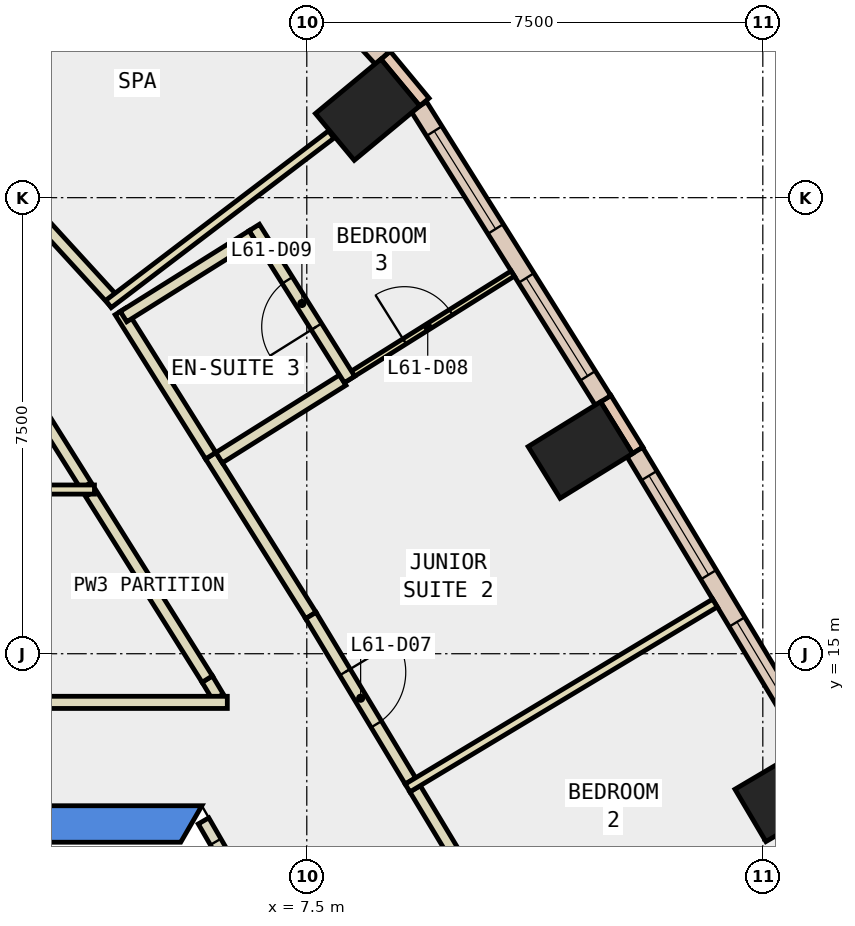
"""IFC4 building model, lengths in metres.
Left out: names, types, materials, properties, quantities, classifications, styles, units other than length and angle.
Written with IfcOpenShell. Run it as: python <this file> out.ifc"""

import sys

from ifc_helpers import new_model, si_unit, direction, frame, frame_2d, origin, origin_2d, place, context, subcontext, project, spatial, polyline, rectangle, outline, extrude, element, fill, save


model = new_model("IFC4")
c1 = context("Model", 3, precision=1e-05, world=origin(), true_north=direction((0.0, 1.0)))
c2 = subcontext(c1, "Body", "Model", "MODEL_VIEW")
j1 = project(units=[si_unit("LENGTHUNIT", "METRE"), si_unit("PLANEANGLEUNIT", "RADIAN")], contexts=[c1])
p1 = place(None, origin())
s1 = spatial("IfcSite", under=j1, at=p1, CompositionType="ELEMENT")
p2 = place(p1, origin())
s2 = spatial("IfcBuilding", under=s1, at=p2, CompositionType="ELEMENT")
p3 = place(p2, frame((0.0, 0.0, 266.6)))
s3 = spatial("IfcBuildingStorey", under=s2, at=p3, CompositionType="ELEMENT", Elevation=266.6)
for number, where, z_axis, x_axis in (
    (1, (15.399, 12.697, -0.34), (0.0, 0.0, 1.0), (-0.509, 0.861, 0.0)),
    (2, (11.999, 18.349, -0.34), (0.0, 0.0, 1.0), (-0.526, 0.851, 0.0)),
    (3, (8.5, 23.946, -0.34), (0.0, 0.0, 1.0), (-0.639, 0.769, 0.0)),
):
    element("IfcColumn", number, at=place(p3, frame(where, z_axis=z_axis, x_axis=x_axis)), inside=s3, PredefinedType="COLUMN", context=c2, shape_type="SweptSolid", body=[
        extrude(rectangle(XDim=1.0, YDim=1.4, at=origin_2d()), origin(), (0.0, 0.0, 1.0), 3.6),
    ])
p4 = place(p3, frame((0.0, 0.0, -0.34)))
e4 = element("IfcWall", 4, at=p4, inside=s3, PredefinedType="SHEAR", context=c2, shape_type="SweptSolid", body=[
    extrude(outline(polyline([(5.774, 12.5), (-5.774, 12.5), (-5.427, 11.9), (5.427, 11.9), (5.774, 12.5)])), origin(), (0.0, 0.0, 1.0), 3.6),
])
p5 = place(p3, frame((12.943, 18.344, 0.0), z_axis=(0.0, 0.0, 1.0), x_axis=(-0.525825307325, 0.850592585306, 0.0)))
e5 = element("IfcWall", 5, at=p5, inside=s3, PredefinedType="STANDARD", context=c2, shape_type="SweptSolid", body=[
    extrude(rectangle(XDim=1.0, YDim=0.2, at=frame_2d((0.5, 0.0))), origin(), (0.0, 0.0, 1.0), 3.26),
])
p6 = place(p3, frame((9.434, 24.072, 0.0), z_axis=(0.0, 0.0, 1.0), x_axis=(-0.638117112481, 0.769939316283, 0.0)))
e6 = element("IfcWall", 6, at=p6, inside=s3, PredefinedType="STANDARD", context=c2, shape_type="SweptSolid", body=[
    extrude(rectangle(XDim=1.0, YDim=0.2, at=frame_2d((0.5, 0.0))), origin(), (0.0, 0.0, 1.0), 3.26),
])
p7 = place(p3, frame((15.788, 13.506, 0.0), z_axis=(0.0, 0.0, 1.0), x_axis=(-0.515435742129, 0.856928232547, 0.0)))
e7 = element("IfcWall", 7, at=p7, inside=s3, PredefinedType="STANDARD", context=c2, shape_type="SweptSolid", body=[
    extrude(rectangle(XDim=5.613, YDim=0.3, at=frame_2d((2.806, 0.0))), origin(), (0.0, 0.0, 1.0), 3.26),
])
p8 = place(p7, frame((0.453, 0.0, 0.9)))
e8 = element("IfcOpeningElement", 8, at=p8, cuts=e7, PredefinedType="OPENING", context=c2, shape_type="SweptSolid", body=[
    extrude(rectangle(XDim=1.9, YDim=2.0, at=frame_2d((0.95, 1.0))), frame((0.0, 0.16, 0.0), z_axis=(0.0, -1.0, 0.0), x_axis=(1.0, 0.0, 0.0)), (0.0, 0.0, 1.0), 0.32),
])
p9 = place(p7, frame((3.26, 0.0, 0.9)))
e9 = element("IfcOpeningElement", 9, at=p9, cuts=e7, PredefinedType="OPENING", context=c2, shape_type="SweptSolid", body=[
    extrude(rectangle(XDim=1.9, YDim=2.0, at=frame_2d((0.95, 1.0))), frame((0.0, 0.16, 0.0), z_axis=(0.0, -1.0, 0.0), x_axis=(1.0, 0.0, 0.0)), (0.0, 0.0, 1.0), 0.32),
])
p10 = place(p3, frame((12.372, 19.166, 0.0), z_axis=(0.0, 0.0, 1.0), x_axis=(-0.531137483242, 0.847285650708, 0.0)))
e10 = element("IfcWall", 10, at=p10, inside=s3, PredefinedType="STANDARD", context=c2, shape_type="SweptSolid", body=[
    extrude(rectangle(XDim=5.703, YDim=0.3, at=frame_2d((2.852, 0.0))), origin(), (0.0, 0.0, 1.0), 3.26),
])
p11 = place(p10, frame((0.476, 0.0, 0.9)))
e11 = element("IfcOpeningElement", 11, at=p11, cuts=e10, PredefinedType="OPENING", context=c2, shape_type="SweptSolid", body=[
    extrude(rectangle(XDim=1.9, YDim=2.0, at=frame_2d((0.95, 1.0))), frame((0.0, 0.16, 0.0), z_axis=(0.0, -1.0, 0.0), x_axis=(1.0, 0.0, 0.0)), (0.0, 0.0, 1.0), 0.32),
])
p12 = place(p10, frame((3.327, 0.0, 0.9)))
e12 = element("IfcOpeningElement", 12, at=p12, cuts=e10, PredefinedType="OPENING", context=c2, shape_type="SweptSolid", body=[
    extrude(rectangle(XDim=1.9, YDim=2.0, at=frame_2d((0.95, 1.0))), frame((0.0, 0.16, 0.0), z_axis=(0.0, -1.0, 0.0), x_axis=(1.0, 0.0, 0.0)), (0.0, 0.0, 1.0), 0.32),
])
p13 = place(p3, frame((8.739, 24.794, 0.0), z_axis=(0.0, 0.0, 1.0), x_axis=(-0.675143863554, 0.737686087374, 0.0)))
e13 = element("IfcWall", 13, at=p13, inside=s3, PredefinedType="STANDARD", context=c2, shape_type="SweptSolid", body=[
    extrude(rectangle(XDim=4.38, YDim=0.3, at=frame_2d((2.19, 0.0))), origin(), (0.0, 0.0, 1.0), 3.26),
])
p14 = place(p13, frame((1.49, 0.0, 0.9)))
e14 = element("IfcOpeningElement", 14, at=p14, cuts=e13, PredefinedType="OPENING", context=c2, shape_type="SweptSolid", body=[
    extrude(rectangle(XDim=1.4, YDim=2.0, at=frame_2d((0.7, 1.0))), frame((0.0, 0.16, 0.0), z_axis=(0.0, -1.0, 0.0), x_axis=(1.0, 0.0, 0.0)), (0.0, 0.0, 1.0), 0.32),
])
p15 = place(p3, frame((6.041, 14.286, 0.0), z_axis=(0.0, 0.0, 1.0), x_axis=(-0.513873647624, 0.857865883619, 0.0)))
e15 = element("IfcWall", 15, at=p15, inside=s3, PredefinedType="PARTITIONING", context=c2, shape_type="SweptSolid", body=[
    extrude(rectangle(XDim=0.346, YDim=0.2, at=frame_2d((0.173, 0.0))), origin(), (0.0, 0.0, 1.0), 3.26),
])
p16 = place(p3, frame((5.863, 14.583, 0.0), z_axis=(0.0, 0.0, 1.0), x_axis=(-0.531380509042, 0.847133256702, 0.0)))
e16 = element("IfcWall", 16, at=p16, inside=s3, PredefinedType="PARTITIONING", context=c2, shape_type="SweptSolid", body=[
    extrude(rectangle(XDim=3.604, YDim=0.2, at=frame_2d((1.802, 0.0))), origin(), (0.0, 0.0, 1.0), 3.26),
])
p17 = place(p3, frame((3.868, 17.764, 0.0), z_axis=(0.0, 0.0, 1.0), x_axis=(-0.531062870102, 0.847332418829, 0.0)))
e17 = element("IfcWall", 17, at=p17, inside=s3, PredefinedType="PARTITIONING", context=c2, shape_type="SweptSolid", body=[
    extrude(rectangle(XDim=2.062, YDim=0.2, at=frame_2d((1.031, 0.0))), origin(), (0.0, 0.0, 1.0), 3.26),
])
p18 = place(p3, frame((9.281, 12.779, 0.0), z_axis=(0.0, 0.0, 1.0), x_axis=(0.515568955032, -0.856848091908, 0.0)))
e18 = element("IfcWall", 18, at=p18, inside=s3, PredefinedType="PARTITIONING", context=c2, shape_type="SweptSolid", body=[
    extrude(rectangle(XDim=3.177, YDim=0.2, at=frame_2d((1.588, 0.0))), origin(), (0.0, 0.0, 1.0), 3.26),
])
p19 = place(p3, frame((5.92, 18.256, 0.0), z_axis=(0.0, 0.0, 1.0), x_axis=(0.531152062518, -0.84727651123, 0.0)))
e19 = element("IfcWall", 19, at=p19, inside=s3, PredefinedType="PARTITIONING", context=c2, shape_type="SweptSolid", body=[
    extrude(rectangle(XDim=3.101, YDim=0.2, at=frame_2d((1.55, 0.0))), origin(), (0.0, 0.0, 1.0), 3.26),
])
p20 = place(p3, frame((7.567, 15.629, 0.0), z_axis=(0.0, 0.0, 1.0), x_axis=(0.51556943596, -0.856847802532, 0.0)))
e20 = element("IfcWall", 20, at=p20, inside=s3, PredefinedType="PARTITIONING", context=c2, shape_type="SweptSolid", body=[
    extrude(rectangle(XDim=3.176, YDim=0.2, at=frame_2d((1.588, 0.0))), origin(), (0.0, 0.0, 1.0), 3.26),
])
p21 = place(p20, frame((1.088, 0.0, 0.0)))
e21 = element("IfcOpeningElement", 21, at=p21, cuts=e20, PredefinedType="OPENING", context=c2, shape_type="SweptSolid", body=[
    extrude(rectangle(XDim=1.0, YDim=2.1, at=frame_2d((0.5, 1.05))), frame((0.0, 0.11, 0.0), z_axis=(0.0, -1.0, 0.0), x_axis=(1.0, 0.0, 0.0)), (0.0, 0.0, 1.0), 0.22),
])
p22 = place(p3, frame((4.433, 20.628, 0.0), z_axis=(0.0, 0.0, 1.0), x_axis=(0.531135189756, -0.84728708842, 0.0)))
e22 = element("IfcWall", 22, at=p22, inside=s3, PredefinedType="PARTITIONING", context=c2, shape_type="SweptSolid", body=[
    extrude(rectangle(XDim=2.799, YDim=0.2, at=frame_2d((1.4, 0.0))), origin(), (0.0, 0.0, 1.0), 3.26),
])
p23 = place(p3, frame((2.084, 23.253, 0.0), z_axis=(0.0, 0.0, 1.0), x_axis=(0.675074517272, -0.737749548377, 0.0)))
e23 = element("IfcWall", 23, at=p23, inside=s3, PredefinedType="PARTITIONING", context=c2, shape_type="SweptSolid", body=[
    extrude(rectangle(XDim=3.334, YDim=0.2, at=frame_2d((1.667, 0.0))), origin(), (0.0, 0.0, 1.0), 3.26),
])
p24 = place(p3, frame((9.157, 12.792, 0.0), z_axis=(0.0, 0.0, 1.0), x_axis=(0.856933793276, 0.515426497129, 0.0)))
e24 = element("IfcWall", 24, at=p24, inside=s3, PredefinedType="PARTITIONING", context=c2, shape_type="SweptSolid", body=[
    extrude(rectangle(XDim=5.9, YDim=0.15, at=frame_2d((2.95, 0.0))), origin(), (0.0, 0.0, 1.0), 3.26),
])
p25 = place(p3, frame((8.091, 19.499, 0.0), z_axis=(0.0, 0.0, 1.0), x_axis=(0.847249319986, 0.53119543464, 0.0)))
e25 = element("IfcWall", 25, at=p25, inside=s3, PredefinedType="PARTITIONING", context=c2, shape_type="SweptSolid", body=[
    extrude(rectangle(XDim=3.3, YDim=0.1, at=frame_2d((1.65, 0.0))), origin(), (0.0, 0.0, 1.0), 3.26),
])
p26 = place(p25, frame((1.2, 0.0, 0.0)))
e26 = element("IfcOpeningElement", 26, at=p26, cuts=e25, PredefinedType="OPENING", context=c2, shape_type="SweptSolid", body=[
    extrude(rectangle(XDim=0.9, YDim=2.1, at=frame_2d((0.45, 1.05))), frame((0.0, 0.06, 0.0), z_axis=(0.0, -1.0, 0.0), x_axis=(1.0, 0.0, 0.0)), (0.0, 0.0, 1.0), 0.12),
])
p27 = place(p3, frame((6.058, 18.224, 0.0), z_axis=(0.0, 0.0, 1.0), x_axis=(0.847191403331, 0.531287799711, 0.0)))
e27 = element("IfcWall", 27, at=p27, inside=s3, PredefinedType="PARTITIONING", context=c2, shape_type="SweptSolid", body=[
    extrude(rectangle(XDim=2.4, YDim=0.2, at=frame_2d((1.2, 0.0))), origin(), (0.0, 0.0, 1.0), 3.26),
])
p28 = place(p3, frame((8.203, 19.51, 0.0), z_axis=(0.0, 0.0, 1.0), x_axis=(-0.531218552952, 0.847234825181, 0.0)))
e28 = element("IfcWall", 28, at=p28, inside=s3, PredefinedType="PARTITIONING", context=c2, shape_type="SweptSolid", body=[
    extrude(rectangle(XDim=2.95, YDim=0.2, at=frame_2d((1.475, 0.0))), origin(), (0.0, 0.0, 1.0), 3.26),
])
p29 = place(p28, frame((1.025, 0.0, 0.0)))
e29 = element("IfcOpeningElement", 29, at=p29, cuts=e28, PredefinedType="OPENING", context=c2, shape_type="SweptSolid", body=[
    extrude(rectangle(XDim=0.9, YDim=2.1, at=frame_2d((0.45, 1.05))), frame((0.0, 0.11, 0.0), z_axis=(0.0, -1.0, 0.0), x_axis=(1.0, 0.0, 0.0)), (0.0, 0.0, 1.0), 0.22),
])
p30 = place(p3, frame((6.604, 21.871, 0.0), z_axis=(0.0, 0.0, 1.0), x_axis=(-0.847377617561, -0.530990746866, 0.0)))
e30 = element("IfcWall", 30, at=p30, inside=s3, PredefinedType="PARTITIONING", context=c2, shape_type="SweptSolid", body=[
    extrude(rectangle(XDim=2.499, YDim=0.2, at=frame_2d((1.25, 0.0))), origin(), (0.0, 0.0, 1.0), 3.26),
])
p31 = place(p3, frame((4.238, 20.751, 0.0), z_axis=(0.0, 0.0, 1.0), x_axis=(0.795806473987, 0.605551034976, 0.0)))
e31 = element("IfcWall", 31, at=p31, inside=s3, PredefinedType="PARTITIONING", context=c2, shape_type="SweptSolid", body=[
    extrude(rectangle(XDim=4.604, YDim=0.15, at=frame_2d((2.302, 0.0))), origin(), (0.0, 0.0, 1.0), 3.26),
])
p32 = place(p3, frame((6.699, 10.697, 0.0), z_axis=(0.0, 0.0, 1.0), x_axis=(-0.499914839587, 0.866074565589, 0.0)))
e32 = element("IfcWall", 32, at=p32, inside=s3, PredefinedType="PARTITIONING", context=c2, shape_type="SweptSolid", body=[
    extrude(rectangle(XDim=1.794, YDim=0.2, at=frame_2d((0.897, 0.0))), origin(), (0.0, 0.0, 1.0), 2.4),
])
p33 = place(p32, frame((0.397, 0.0, 0.0)))
e33 = element("IfcOpeningElement", 33, at=p33, cuts=e32, PredefinedType="OPENING", context=c2, shape_type="SweptSolid", body=[
    extrude(rectangle(XDim=1.0, YDim=2.1, at=frame_2d((0.5, 1.05))), frame((0.0, 0.11, 0.0), z_axis=(0.0, -1.0, 0.0), x_axis=(1.0, 0.0, 0.0)), (0.0, 0.0, 1.0), 0.22),
])
p34 = place(p3, frame((0.4, 14.2, 0.0), z_axis=(0.0, 0.0, 1.0), x_axis=(1.0, 0.0, 0.0)))
e34 = element("IfcWall", 34, at=p34, inside=s3, PredefinedType="PARTITIONING", context=c2, shape_type="SweptSolid", body=[
    extrude(rectangle(XDim=5.793, YDim=0.2, at=frame_2d((2.896, 0.0))), origin(), (0.0, 0.0, 1.0), 3.26),
])
p35 = place(p34, frame((0.095, 0.0, 0.0)))
e35 = element("IfcOpeningElement", 35, at=p35, cuts=e34, PredefinedType="OPENING", context=c2, shape_type="SweptSolid", body=[
    extrude(rectangle(XDim=1.0, YDim=2.1, at=frame_2d((0.5, 1.05))), frame((0.0, 0.11, 0.0), z_axis=(0.0, -1.0, 0.0), x_axis=(1.0, 0.0, 0.0)), (0.0, 0.0, 1.0), 0.22),
])
p36 = place(p3, frame((0.4, 17.7, 0.0), z_axis=(0.0, 0.0, 1.0), x_axis=(1.0, 0.0, 0.0)))
e36 = element("IfcWall", 36, at=p36, inside=s3, PredefinedType="PARTITIONING", context=c2, shape_type="SweptSolid", body=[
    extrude(rectangle(XDim=3.608, YDim=0.15, at=frame_2d((1.804, 0.0))), origin(), (0.0, 0.0, 1.0), 3.26),
])
p37 = place(p8, origin())
e37 = element("IfcWindow", 37, at=p37, inside=s3, PartitioningType="SINGLE_PANEL", PredefinedType="WINDOW", context=c2, shape_type="SweptSolid", body=[
    extrude(rectangle(XDim=1.9, YDim=2.0, at=frame_2d((0.95, 1.0))), frame((0.0, 0.03, 0.0), z_axis=(0.0, -1.0, 0.0), x_axis=(1.0, 0.0, 0.0)), (0.0, 0.0, 1.0), 0.06),
])
fill(e8, e37)
p38 = place(p9, origin())
e38 = element("IfcWindow", 38, at=p38, inside=s3, PartitioningType="SINGLE_PANEL", PredefinedType="WINDOW", context=c2, shape_type="SweptSolid", body=[
    extrude(rectangle(XDim=1.9, YDim=2.0, at=frame_2d((0.95, 1.0))), frame((0.0, 0.03, 0.0), z_axis=(0.0, -1.0, 0.0), x_axis=(1.0, 0.0, 0.0)), (0.0, 0.0, 1.0), 0.06),
])
fill(e9, e38)
p39 = place(p11, origin())
e39 = element("IfcWindow", 39, at=p39, inside=s3, PartitioningType="SINGLE_PANEL", PredefinedType="WINDOW", context=c2, shape_type="SweptSolid", body=[
    extrude(rectangle(XDim=1.9, YDim=2.0, at=frame_2d((0.95, 1.0))), frame((0.0, 0.03, 0.0), z_axis=(0.0, -1.0, 0.0), x_axis=(1.0, 0.0, 0.0)), (0.0, 0.0, 1.0), 0.06),
])
fill(e11, e39)
p40 = place(p12, origin())
e40 = element("IfcWindow", 40, at=p40, inside=s3, PartitioningType="SINGLE_PANEL", PredefinedType="WINDOW", context=c2, shape_type="SweptSolid", body=[
    extrude(rectangle(XDim=1.9, YDim=2.0, at=frame_2d((0.95, 1.0))), frame((0.0, 0.03, 0.0), z_axis=(0.0, -1.0, 0.0), x_axis=(1.0, 0.0, 0.0)), (0.0, 0.0, 1.0), 0.06),
])
fill(e12, e40)
p41 = place(p21, origin())
e41 = element("IfcDoor", 41, at=p41, inside=s3, OperationType="SINGLE_SWING_RIGHT", PredefinedType="DOOR", context=c2, shape_type="SweptSolid", body=[
    extrude(rectangle(XDim=1.0, YDim=2.1, at=frame_2d((0.5, 1.05))), frame((0.0, 0.025, 0.0), z_axis=(0.0, -1.0, 0.0), x_axis=(1.0, 0.0, 0.0)), (0.0, 0.0, 1.0), 0.05),
])
fill(e21, e41)
p42 = place(p26, origin())
e42 = element("IfcDoor", 42, at=p42, inside=s3, OperationType="SINGLE_SWING_LEFT", PredefinedType="DOOR", context=c2, shape_type="SweptSolid", body=[
    extrude(rectangle(XDim=0.9, YDim=2.1, at=frame_2d((0.45, 1.05))), frame((0.0, 0.025, 0.0), z_axis=(0.0, -1.0, 0.0), x_axis=(1.0, 0.0, 0.0)), (0.0, 0.0, 1.0), 0.05),
])
fill(e26, e42)
p43 = place(p29, origin())
e43 = element("IfcDoor", 43, at=p43, inside=s3, OperationType="SINGLE_SWING_RIGHT", PredefinedType="DOOR", context=c2, shape_type="SweptSolid", body=[
    extrude(rectangle(XDim=0.9, YDim=2.1, at=frame_2d((0.45, 1.05))), frame((0.0, 0.025, 0.0), z_axis=(0.0, -1.0, 0.0), x_axis=(1.0, 0.0, 0.0)), (0.0, 0.0, 1.0), 0.05),
])
fill(e29, e43)
p44 = place(p33, origin())
e44 = element("IfcDoor", 44, at=p44, inside=s3, OperationType="SINGLE_SWING_LEFT", PredefinedType="DOOR", context=c2, shape_type="SweptSolid", body=[
    extrude(rectangle(XDim=1.0, YDim=2.1, at=frame_2d((0.5, 1.05))), frame((0.0, 0.025, 0.0), z_axis=(0.0, -1.0, 0.0), x_axis=(1.0, 0.0, 0.0)), (0.0, 0.0, 1.0), 0.05),
])
fill(e33, e44)
save(model, sys.argv[1])
